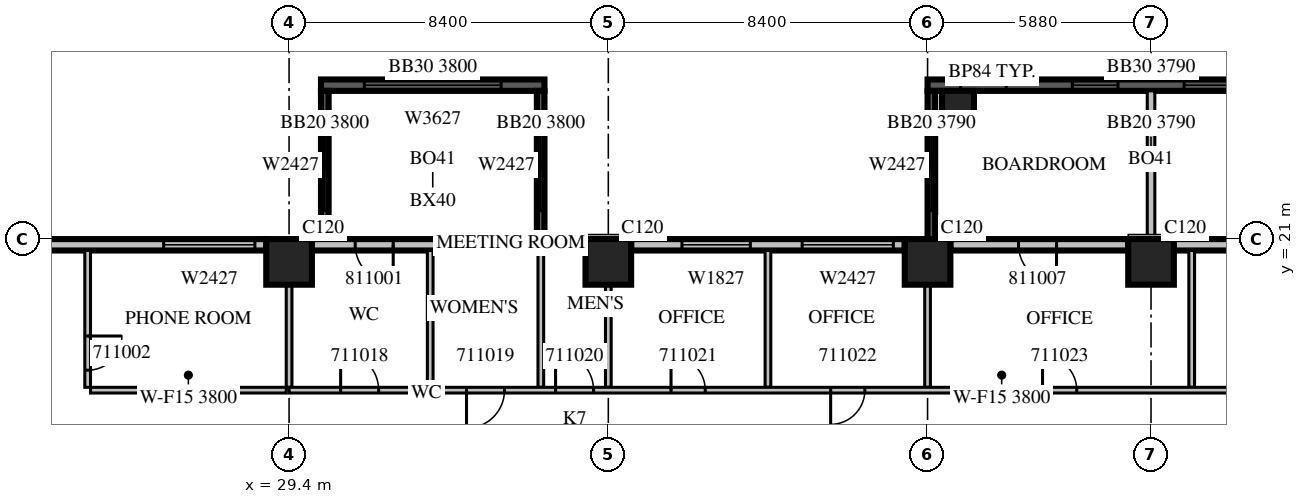
"""IFC4 building model, lengths in metres.
Left out: names, types, materials, properties, quantities, classifications, styles, units other than length and angle.
Written with IfcOpenShell. Run it as: python <this file> out.ifc"""

import sys

from ifc_helpers import new_model, si_unit, direction, frame, frame_2d, origin, origin_2d, place, context, subcontext, project, spatial, rectangle, extrude, source, transform, mapped, element, fill, save


model = new_model("IFC4")
c1 = context("Model", 3, precision=1e-05, world=origin(), true_north=direction((0.0, 1.0)))
c2 = subcontext(c1, "Body", "Model", "MODEL_VIEW")
j1 = project(units=[si_unit("LENGTHUNIT", "METRE"), si_unit("PLANEANGLEUNIT", "RADIAN")], contexts=[c1])
p1 = place(None, origin())
s1 = spatial("IfcSite", under=j1, at=p1, CompositionType="ELEMENT")
p2 = place(p1, origin())
s2 = spatial("IfcBuilding", under=s1, at=p2, CompositionType="ELEMENT")
p3 = place(p2, frame((0.0, 0.0, 57.3)))
s3 = spatial("IfcBuildingStorey", under=s2, at=p3, CompositionType="ELEMENT", Elevation=57.3)
m1 = source(origin(), c2, "Body", "SweptSolid", [
    extrude(rectangle(XDim=1.2, YDim=1.2, at=origin_2d()), origin(), (0.0, 0.0, 1.0), 4.2),
])
for number, where, z_axis, x_axis in (
    (1, (29.4, 20.4, 0.0), (0.0, 0.0, 1.0), (1.0, 0.0, 0.0)),
    (2, (37.8, 20.4, 0.0), (0.0, 0.0, 1.0), (1.0, 0.0, 0.0)),
    (3, (46.2, 20.4, 0.0), (0.0, 0.0, 1.0), (1.0, 0.0, 0.0)),
    (4, (52.08, 20.4, 0.0), (0.0, 0.0, 1.0), (1.0, 0.0, 0.0)),
):
    element("IfcColumn", number, at=place(p3, frame(where, z_axis=z_axis, x_axis=x_axis)), inside=s3, PredefinedType="COLUMN", context=c2, shape_type="MappedRepresentation", body=[
        mapped(m1, transform((0.0, 0.0, 0.0), scale=1.0)),
    ])
m2 = source(origin(), c2, "Body", "SweptSolid", [
    extrude(rectangle(XDim=0.84, YDim=0.84, at=origin_2d()), origin(), (0.0, 0.0, 1.0), 4.2),
])
p4 = place(p3, frame((47.0, 24.48, 0.0), z_axis=(0.0, 0.0, 1.0), x_axis=(1.0, 0.0, 0.0)))
e5 = element("IfcColumn", 5, at=p4, inside=s3, PredefinedType="COLUMN", context=c2, shape_type="MappedRepresentation", body=[
    mapped(m2, transform((0.0, 0.0, 0.0), scale=1.0)),
])
m3 = source(origin(), c2, "Body", "SweptSolid", [
    extrude(rectangle(XDim=11.76, YDim=0.3, at=frame_2d((5.88, 0.0))), origin(), (0.0, 0.0, 1.0), 3.79),
])
p5 = place(p3, frame((57.96, 25.05, 0.0), z_axis=(0.0, 0.0, 1.0), x_axis=(-1.0, 0.0, 0.0)))
e6 = element("IfcWall", 6, at=p5, inside=s3, PredefinedType="SOLIDWALL", context=c2, shape_type="MappedRepresentation", body=[
    mapped(m3, transform((0.0, 0.0, 0.0), scale=1.0)),
])
m4 = source(origin(), c2, "Body", "SweptSolid", [
    extrude(rectangle(XDim=1.2, YDim=2.7, at=frame_2d((0.6, 1.35))), frame((0.0, 0.16, 0.0), z_axis=(0.0, -1.0, 0.0), x_axis=(1.0, 0.0, 0.0)), (0.0, 0.0, 1.0), 0.32),
])
p6 = place(p5, frame((0.87, 0.0, 0.6)))
e7 = element("IfcOpeningElement", 7, at=p6, cuts=e6, PredefinedType="OPENING", context=c2, shape_type="MappedRepresentation", body=[
    mapped(m4, transform((0.0, 0.0, 0.0), scale=1.0)),
])
p7 = place(p5, frame((3.81, 0.0, 0.6)))
e8 = element("IfcOpeningElement", 8, at=p7, cuts=e6, PredefinedType="OPENING", context=c2, shape_type="MappedRepresentation", body=[
    mapped(m4, transform((0.0, 0.0, 0.0), scale=1.0)),
])
p8 = place(p5, frame((6.75, 0.0, 0.6)))
e9 = element("IfcOpeningElement", 9, at=p8, cuts=e6, PredefinedType="OPENING", context=c2, shape_type="MappedRepresentation", body=[
    mapped(m4, transform((0.0, 0.0, 0.0), scale=1.0)),
])
p9 = place(p5, frame((9.69, 0.0, 0.6)))
e10 = element("IfcOpeningElement", 10, at=p9, cuts=e6, PredefinedType="OPENING", context=c2, shape_type="MappedRepresentation", body=[
    mapped(m4, transform((0.0, 0.0, 0.0), scale=1.0)),
])
m5 = source(origin(), c2, "Body", "SweptSolid", [
    extrude(rectangle(XDim=3.9, YDim=0.2, at=frame_2d((1.95, 0.0))), origin(), (0.0, 0.0, 1.0), 3.79),
])
p10 = place(p3, frame((52.08, 21.0, 0.0), z_axis=(0.0, 0.0, 1.0), x_axis=(0.0, 1.0, 0.0)))
e11 = element("IfcWall", 11, at=p10, inside=s3, PredefinedType="SOLIDWALL", context=c2, shape_type="MappedRepresentation", body=[
    mapped(m5, transform((0.0, 0.0, 0.0), scale=1.0)),
])
m6 = source(origin(), c2, "Body", "SweptSolid", [
    extrude(rectangle(XDim=3.9, YDim=0.2, at=frame_2d((1.95, 0.0))), origin(), (0.0, 0.0, 1.0), 3.79),
])
p11 = place(p3, frame((46.3, 21.0, 0.0), z_axis=(0.0, 0.0, 1.0), x_axis=(0.0, 1.0, 0.0)))
e12 = element("IfcWall", 12, at=p11, inside=s3, PredefinedType="SOLIDWALL", context=c2, shape_type="MappedRepresentation", body=[
    mapped(m6, transform((0.0, 0.0, 0.0), scale=1.0)),
])
m7 = source(origin(), c2, "Body", "SweptSolid", [
    extrude(rectangle(XDim=2.4, YDim=2.7, at=frame_2d((1.2, 1.35))), frame((0.0, 0.11, 0.0), z_axis=(0.0, -1.0, 0.0), x_axis=(1.0, 0.0, 0.0)), (0.0, 0.0, 1.0), 0.22),
])
p12 = place(p11, frame((0.75, 0.0, 0.6)))
e13 = element("IfcOpeningElement", 13, at=p12, cuts=e12, PredefinedType="OPENING", context=c2, shape_type="MappedRepresentation", body=[
    mapped(m7, transform((0.0, 0.0, 0.0), scale=1.0)),
])
m8 = source(origin(), c2, "Body", "SweptSolid", [
    extrude(rectangle(XDim=5.88, YDim=0.3, at=frame_2d((2.94, 0.0))), origin(), (0.0, 0.0, 1.0), 3.8),
])
p13 = place(p3, frame((36.12, 25.05, 0.0), z_axis=(0.0, 0.0, 1.0), x_axis=(-1.0, 0.0, 0.0)))
e14 = element("IfcWall", 14, at=p13, inside=s3, PredefinedType="SOLIDWALL", context=c2, shape_type="MappedRepresentation", body=[
    mapped(m8, transform((0.0, 0.0, 0.0), scale=1.0)),
])
m9 = source(origin(), c2, "Body", "SweptSolid", [
    extrude(rectangle(XDim=3.6, YDim=2.7, at=frame_2d((1.8, 1.35))), frame((0.0, 0.16, 0.0), z_axis=(0.0, -1.0, 0.0), x_axis=(1.0, 0.0, 0.0)), (0.0, 0.0, 1.0), 0.32),
])
p14 = place(p13, frame((1.14, 0.0, 0.6)))
e15 = element("IfcOpeningElement", 15, at=p14, cuts=e14, PredefinedType="OPENING", context=c2, shape_type="MappedRepresentation", body=[
    mapped(m9, transform((0.0, 0.0, 0.0), scale=1.0)),
])
m10 = source(origin(), c2, "Body", "SweptSolid", [
    extrude(rectangle(XDim=3.9, YDim=0.2, at=frame_2d((1.95, 0.0))), origin(), (0.0, 0.0, 1.0), 3.8),
])
p15 = place(p3, frame((36.02, 21.0, 0.0), z_axis=(0.0, 0.0, 1.0), x_axis=(0.0, 1.0, 0.0)))
e16 = element("IfcWall", 16, at=p15, inside=s3, PredefinedType="SOLIDWALL", context=c2, shape_type="MappedRepresentation", body=[
    mapped(m10, transform((0.0, 0.0, 0.0), scale=1.0)),
])
p16 = place(p15, frame((0.75, 0.0, 0.6)))
e17 = element("IfcOpeningElement", 17, at=p16, cuts=e16, PredefinedType="OPENING", context=c2, shape_type="MappedRepresentation", body=[
    mapped(m7, transform((0.0, 0.0, 0.0), scale=1.0)),
])
p17 = place(p3, frame((30.34, 21.0, 0.0), z_axis=(0.0, 0.0, 1.0), x_axis=(0.0, 1.0, 0.0)))
e18 = element("IfcWall", 18, at=p17, inside=s3, PredefinedType="SOLIDWALL", context=c2, shape_type="MappedRepresentation", body=[
    mapped(m10, transform((0.0, 0.0, 0.0), scale=1.0)),
])
p18 = place(p17, frame((0.75, 0.0, 0.6)))
e19 = element("IfcOpeningElement", 19, at=p18, cuts=e18, PredefinedType="OPENING", context=c2, shape_type="MappedRepresentation", body=[
    mapped(m7, transform((0.0, 0.0, 0.0), scale=1.0)),
])
m11 = source(origin(), c2, "Body", "SweptSolid", [
    extrude(rectangle(XDim=4.68, YDim=0.3, at=frame_2d((2.34, 0.0))), origin(), (0.0, 0.0, 1.0), 3.8),
])
p19 = place(p3, frame((57.36, 20.85, 0.0), z_axis=(0.0, 0.0, 1.0), x_axis=(-1.0, 0.0, 0.0)))
e20 = element("IfcWall", 20, at=p19, inside=s3, PredefinedType="STANDARD", context=c2, shape_type="MappedRepresentation", body=[
    mapped(m11, transform((0.0, 0.0, 0.0), scale=1.0)),
])
m12 = source(origin(), c2, "Body", "SweptSolid", [
    extrude(rectangle(XDim=1.0, YDim=2.1, at=frame_2d((0.5, 1.05))), frame((0.0, 0.16, 0.0), z_axis=(0.0, -1.0, 0.0), x_axis=(1.0, 0.0, 0.0)), (0.0, 0.0, 1.0), 0.32),
])
p20 = place(p19, frame((1.793, 0.0, 0.0)))
e21 = element("IfcOpeningElement", 21, at=p20, cuts=e20, PredefinedType="OPENING", context=c2, shape_type="MappedRepresentation", body=[
    mapped(m12, transform((0.0, 0.0, 0.0), scale=1.0)),
])
p21 = place(p3, frame((51.48, 20.85, 0.0), z_axis=(0.0, 0.0, 1.0), x_axis=(-1.0, 0.0, 0.0)))
e22 = element("IfcWall", 22, at=p21, inside=s3, PredefinedType="STANDARD", context=c2, shape_type="MappedRepresentation", body=[
    mapped(m11, transform((0.0, 0.0, 0.0), scale=1.0)),
])
p22 = place(p21, frame((1.887, 0.0, 0.0)))
e23 = element("IfcOpeningElement", 23, at=p22, cuts=e22, PredefinedType="OPENING", context=c2, shape_type="MappedRepresentation", body=[
    mapped(m12, transform((0.0, 0.0, 0.0), scale=1.0)),
])
m13 = source(origin(), c2, "Body", "SweptSolid", [
    extrude(rectangle(XDim=7.2, YDim=0.3, at=frame_2d((3.6, 0.0))), origin(), (0.0, 0.0, 1.0), 3.8),
])
p23 = place(p3, frame((45.6, 20.85, 0.0), z_axis=(0.0, 0.0, 1.0), x_axis=(-1.0, 0.0, 0.0)))
e24 = element("IfcWall", 24, at=p23, inside=s3, PredefinedType="STANDARD", context=c2, shape_type="MappedRepresentation", body=[
    mapped(m13, transform((0.0, 0.0, 0.0), scale=1.0)),
])
m14 = source(origin(), c2, "Body", "SweptSolid", [
    extrude(rectangle(XDim=2.4, YDim=2.7, at=frame_2d((1.2, 1.35))), frame((0.0, 0.16, 0.0), z_axis=(0.0, -1.0, 0.0), x_axis=(1.0, 0.0, 0.0)), (0.0, 0.0, 1.0), 0.32),
])
p24 = place(p23, frame((0.3, 0.0, 0.6)))
e25 = element("IfcOpeningElement", 25, at=p24, cuts=e24, PredefinedType="OPENING", context=c2, shape_type="MappedRepresentation", body=[
    mapped(m14, transform((0.0, 0.0, 0.0), scale=1.0)),
])
m15 = source(origin(), c2, "Body", "SweptSolid", [
    extrude(rectangle(XDim=1.8, YDim=2.7, at=frame_2d((0.9, 1.35))), frame((0.0, 0.16, 0.0), z_axis=(0.0, -1.0, 0.0), x_axis=(1.0, 0.0, 0.0)), (0.0, 0.0, 1.0), 0.32),
])
p25 = place(p23, frame((4.062, 0.0, 0.6)))
e26 = element("IfcOpeningElement", 26, at=p25, cuts=e24, PredefinedType="OPENING", context=c2, shape_type="MappedRepresentation", body=[
    mapped(m15, transform((0.0, 0.0, 0.0), scale=1.0)),
])
p26 = place(p3, frame((37.2, 20.85, 0.0), z_axis=(0.0, 0.0, 1.0), x_axis=(-1.0, 0.0, 0.0)))
e27 = element("IfcWall", 27, at=p26, inside=s3, PredefinedType="STANDARD", context=c2, shape_type="MappedRepresentation", body=[
    mapped(m13, transform((0.0, 0.0, 0.0), scale=1.0)),
])
p27 = place(p26, frame((5.06, 0.0, 0.0)))
e28 = element("IfcOpeningElement", 28, at=p27, cuts=e27, PredefinedType="OPENING", context=c2, shape_type="MappedRepresentation", body=[
    mapped(m12, transform((0.0, 0.0, 0.0), scale=1.0)),
])
m16 = source(origin(), c2, "Body", "SweptSolid", [
    extrude(rectangle(XDim=6.6, YDim=0.3, at=frame_2d((3.3, 0.0))), origin(), (0.0, 0.0, 1.0), 3.8),
])
p28 = place(p3, frame((28.8, 20.85, 0.0), z_axis=(0.0, 0.0, 1.0), x_axis=(-1.0, 0.0, 0.0)))
e29 = element("IfcWall", 29, at=p28, inside=s3, PredefinedType="STANDARD", context=c2, shape_type="MappedRepresentation", body=[
    mapped(m16, transform((0.0, 0.0, 0.0), scale=1.0)),
])
p29 = place(p28, frame((0.3, 0.0, 0.6)))
e30 = element("IfcOpeningElement", 30, at=p29, cuts=e29, PredefinedType="OPENING", context=c2, shape_type="MappedRepresentation", body=[
    mapped(m14, transform((0.0, 0.0, 0.0), scale=1.0)),
])
m17 = source(origin(), c2, "Body", "SweptSolid", [
    extrude(rectangle(XDim=3.6, YDim=0.15, at=frame_2d((1.8, 0.0))), origin(), (0.0, 0.0, 1.0), 3.8),
])
p30 = place(p3, frame((24.1, 20.7, 0.0), z_axis=(0.0, 0.0, 1.0), x_axis=(0.0, -1.0, 0.0)))
e31 = element("IfcWall", 31, at=p30, inside=s3, PredefinedType="PARTITIONING", context=c2, shape_type="MappedRepresentation", body=[
    mapped(m17, transform((0.0, 0.0, 0.0), scale=1.0)),
])
m18 = source(origin(), c2, "Body", "SweptSolid", [
    extrude(rectangle(XDim=0.9, YDim=2.1, at=frame_2d((0.45, 1.05))), frame((0.0, 0.085, 0.0), z_axis=(0.0, -1.0, 0.0), x_axis=(1.0, 0.0, 0.0)), (0.0, 0.0, 1.0), 0.17),
])
p31 = place(p30, frame((2.25, 0.0, 0.0)))
e32 = element("IfcOpeningElement", 32, at=p31, cuts=e31, PredefinedType="OPENING", context=c2, shape_type="MappedRepresentation", body=[
    mapped(m18, transform((0.0, 0.0, 0.0), scale=1.0)),
])
m19 = source(origin(), c2, "Body", "SweptSolid", [
    extrude(rectangle(XDim=5.15, YDim=0.15, at=frame_2d((2.575, 0.0))), origin(), (0.0, 0.0, 1.0), 3.8),
])
p32 = place(p3, frame((24.175, 17.025, 0.0), z_axis=(0.0, 0.0, 1.0), x_axis=(1.0, 0.0, 0.0)))
e33 = element("IfcWall", 33, at=p32, inside=s3, PredefinedType="PARTITIONING", context=c2, shape_type="MappedRepresentation", body=[
    mapped(m19, transform((0.0, 0.0, 0.0), scale=1.0)),
])
m20 = source(origin(), c2, "Body", "SweptSolid", [
    extrude(rectangle(XDim=2.701, YDim=0.15, at=frame_2d((1.351, 0.0))), origin(), (0.0, 0.0, 1.0), 3.8),
])
p33 = place(p3, frame((29.4, 17.1, 0.0), z_axis=(0.0, 0.0, 1.0), x_axis=(0.0, 1.0, 0.0)))
e34 = element("IfcWall", 34, at=p33, inside=s3, PredefinedType="PARTITIONING", context=c2, shape_type="MappedRepresentation", body=[
    mapped(m20, transform((0.0, 0.0, 0.0), scale=1.0)),
])
for number, where, z_axis, x_axis in (
    (35, (33.113, 20.7, 0.0), (0.0, 0.0, 1.0), (0.0, -1.0, 0.0)),
    (36, (36.024, 20.7, 0.0), (0.0, 0.0, 1.0), (0.0, -1.0, 0.0)),
    (37, (42.0, 20.7, 0.0), (0.0, 0.0, 1.0), (0.0, -1.0, 0.0)),
    (38, (53.15, 20.7, 0.0), (0.0, 0.0, 1.0), (0.0, -1.0, 0.0)),
):
    element("IfcWall", number, at=place(p3, frame(where, z_axis=z_axis, x_axis=x_axis)), inside=s3, PredefinedType="PARTITIONING", context=c2, shape_type="MappedRepresentation", body=[
        mapped(m17, transform((0.0, 0.0, 0.0), scale=1.0)),
    ])
for number, where, z_axis, x_axis in (
    (39, (37.8, 17.1, 0.0), (0.0, 0.0, 1.0), (0.0, 1.0, 0.0)),
    (40, (46.2, 17.1, 0.0), (0.0, 0.0, 1.0), (0.0, 1.0, 0.0)),
):
    element("IfcWall", number, at=place(p3, frame(where, z_axis=z_axis, x_axis=x_axis)), inside=s3, PredefinedType="PARTITIONING", context=c2, shape_type="MappedRepresentation", body=[
        mapped(m20, transform((0.0, 0.0, 0.0), scale=1.0)),
    ])
m21 = source(origin(), c2, "Body", "SweptSolid", [
    extrude(rectangle(XDim=37.5, YDim=0.15, at=frame_2d((18.75, 0.0))), origin(), (0.0, 0.0, 1.0), 3.8),
])
p34 = place(p3, frame((29.4, 17.025, 0.0), z_axis=(0.0, 0.0, 1.0), x_axis=(1.0, 0.0, 0.0)))
e41 = element("IfcWall", 41, at=p34, inside=s3, PredefinedType="PARTITIONING", context=c2, shape_type="MappedRepresentation", body=[
    mapped(m21, transform((0.0, 0.0, 0.0), scale=1.0)),
])
m22 = source(origin(), c2, "Body", "SweptSolid", [
    extrude(rectangle(XDim=1.0, YDim=2.1, at=frame_2d((0.5, 1.05))), frame((0.0, 0.085, 0.0), z_axis=(0.0, -1.0, 0.0), x_axis=(1.0, 0.0, 0.0)), (0.0, 0.0, 1.0), 0.17),
])
p35 = place(p34, frame((1.357, 0.0, 0.0)))
e42 = element("IfcOpeningElement", 42, at=p35, cuts=e41, PredefinedType="OPENING", context=c2, shape_type="MappedRepresentation", body=[
    mapped(m22, transform((0.0, 0.0, 0.0), scale=1.0)),
])
p36 = place(p34, frame((4.669, 0.0, 0.0)))
e43 = element("IfcOpeningElement", 43, at=p36, cuts=e41, PredefinedType="OPENING", context=c2, shape_type="MappedRepresentation", body=[
    mapped(m22, transform((0.0, 0.0, 0.0), scale=1.0)),
])
p37 = place(p34, frame((7.012, 0.0, 0.0)))
e44 = element("IfcOpeningElement", 44, at=p37, cuts=e41, PredefinedType="OPENING", context=c2, shape_type="MappedRepresentation", body=[
    mapped(m22, transform((0.0, 0.0, 0.0), scale=1.0)),
])
p38 = place(p34, frame((10.05, 0.0, 0.0)))
e45 = element("IfcOpeningElement", 45, at=p38, cuts=e41, PredefinedType="OPENING", context=c2, shape_type="MappedRepresentation", body=[
    mapped(m18, transform((0.0, 0.0, 0.0), scale=1.0)),
])
p39 = place(p34, frame((14.25, 0.0, 0.0)))
e46 = element("IfcOpeningElement", 46, at=p39, cuts=e41, PredefinedType="OPENING", context=c2, shape_type="MappedRepresentation", body=[
    mapped(m18, transform((0.0, 0.0, 0.0), scale=1.0)),
])
p40 = place(p34, frame((19.825, 0.0, 0.0)))
e47 = element("IfcOpeningElement", 47, at=p40, cuts=e41, PredefinedType="OPENING", context=c2, shape_type="MappedRepresentation", body=[
    mapped(m18, transform((0.0, 0.0, 0.0), scale=1.0)),
])
p41 = place(p34, frame((26.738, 0.0, 0.0)))
e48 = element("IfcOpeningElement", 48, at=p41, cuts=e41, PredefinedType="OPENING", context=c2, shape_type="MappedRepresentation", body=[
    mapped(m18, transform((0.0, 0.0, 0.0), scale=1.0)),
])
p42 = place(p34, frame((33.65, 0.0, 0.0)))
e49 = element("IfcOpeningElement", 49, at=p42, cuts=e41, PredefinedType="OPENING", context=c2, shape_type="MappedRepresentation", body=[
    mapped(m18, transform((0.0, 0.0, 0.0), scale=1.0)),
])
m23 = source(origin(), c2, "Body", "SweptSolid", [
    extrude(rectangle(XDim=1.2, YDim=2.7, at=frame_2d((0.6, 1.35))), frame((0.0, 0.03, 0.0), z_axis=(0.0, -1.0, 0.0), x_axis=(1.0, 0.0, 0.0)), (0.0, 0.0, 1.0), 0.06),
])
p43 = place(p7, origin())
e50 = element("IfcWindow", 50, at=p43, inside=s3, PartitioningType="SINGLE_PANEL", PredefinedType="WINDOW", context=c2, shape_type="MappedRepresentation", body=[
    mapped(m23, transform((0.0, 0.0, 0.0), scale=1.0)),
])
fill(e8, e50)
p44 = place(p8, origin())
e51 = element("IfcWindow", 51, at=p44, inside=s3, PartitioningType="SINGLE_PANEL", PredefinedType="WINDOW", context=c2, shape_type="MappedRepresentation", body=[
    mapped(m23, transform((0.0, 0.0, 0.0), scale=1.0)),
])
fill(e9, e51)
p45 = place(p9, origin())
e52 = element("IfcWindow", 52, at=p45, inside=s3, PartitioningType="SINGLE_PANEL", PredefinedType="WINDOW", context=c2, shape_type="MappedRepresentation", body=[
    mapped(m23, transform((0.0, 0.0, 0.0), scale=1.0)),
])
fill(e10, e52)
m24 = source(origin(), c2, "Body", "SweptSolid", [
    extrude(rectangle(XDim=2.4, YDim=2.7, at=frame_2d((1.2, 1.35))), frame((0.0, 0.03, 0.0), z_axis=(0.0, -1.0, 0.0), x_axis=(1.0, 0.0, 0.0)), (0.0, 0.0, 1.0), 0.06),
])
p46 = place(p12, origin())
e53 = element("IfcWindow", 53, at=p46, inside=s3, PartitioningType="SINGLE_PANEL", PredefinedType="WINDOW", context=c2, shape_type="MappedRepresentation", body=[
    mapped(m24, transform((0.0, 0.0, 0.0), scale=1.0)),
])
fill(e13, e53)
m25 = source(origin(), c2, "Body", "SweptSolid", [
    extrude(rectangle(XDim=3.6, YDim=2.7, at=frame_2d((1.8, 1.35))), frame((0.0, 0.03, 0.0), z_axis=(0.0, -1.0, 0.0), x_axis=(1.0, 0.0, 0.0)), (0.0, 0.0, 1.0), 0.06),
])
p47 = place(p14, origin())
e54 = element("IfcWindow", 54, at=p47, inside=s3, PartitioningType="SINGLE_PANEL", PredefinedType="WINDOW", context=c2, shape_type="MappedRepresentation", body=[
    mapped(m25, transform((0.0, 0.0, 0.0), scale=1.0)),
])
fill(e15, e54)
p48 = place(p16, origin())
e55 = element("IfcWindow", 55, at=p48, inside=s3, PartitioningType="SINGLE_PANEL", PredefinedType="WINDOW", context=c2, shape_type="MappedRepresentation", body=[
    mapped(m24, transform((0.0, 0.0, 0.0), scale=1.0)),
])
fill(e17, e55)
p49 = place(p18, origin())
e56 = element("IfcWindow", 56, at=p49, inside=s3, PartitioningType="SINGLE_PANEL", PredefinedType="WINDOW", context=c2, shape_type="MappedRepresentation", body=[
    mapped(m24, transform((0.0, 0.0, 0.0), scale=1.0)),
])
fill(e19, e56)
p50 = place(p24, origin())
e57 = element("IfcWindow", 57, at=p50, inside=s3, PartitioningType="SINGLE_PANEL", PredefinedType="WINDOW", context=c2, shape_type="MappedRepresentation", body=[
    mapped(m24, transform((0.0, 0.0, 0.0), scale=1.0)),
])
fill(e25, e57)
p51 = place(p29, origin())
e58 = element("IfcWindow", 58, at=p51, inside=s3, PartitioningType="SINGLE_PANEL", PredefinedType="WINDOW", context=c2, shape_type="MappedRepresentation", body=[
    mapped(m24, transform((0.0, 0.0, 0.0), scale=1.0)),
])
fill(e30, e58)
m26 = source(origin(), c2, "Body", "SweptSolid", [
    extrude(rectangle(XDim=1.8, YDim=2.7, at=frame_2d((0.9, 1.35))), frame((0.0, 0.03, 0.0), z_axis=(0.0, -1.0, 0.0), x_axis=(1.0, 0.0, 0.0)), (0.0, 0.0, 1.0), 0.06),
])
p52 = place(p25, origin())
e59 = element("IfcWindow", 59, at=p52, inside=s3, PartitioningType="SINGLE_PANEL", PredefinedType="WINDOW", context=c2, shape_type="MappedRepresentation", body=[
    mapped(m26, transform((0.0, 0.0, 0.0), scale=1.0)),
])
fill(e26, e59)
m27 = source(origin(), c2, "Body", "SweptSolid", [
    extrude(rectangle(XDim=0.9, YDim=2.1, at=frame_2d((0.45, 1.05))), frame((0.0, 0.025, 0.0), z_axis=(0.0, -1.0, 0.0), x_axis=(1.0, 0.0, 0.0)), (0.0, 0.0, 1.0), 0.05),
])
p53 = place(p31, origin())
e60 = element("IfcDoor", 60, at=p53, inside=s3, OperationType="SINGLE_SWING_LEFT", PredefinedType="DOOR", context=c2, shape_type="MappedRepresentation", body=[
    mapped(m27, transform((0.0, 0.0, 0.0), scale=1.0)),
])
fill(e32, e60)
m28 = source(origin(), c2, "Body", "SweptSolid", [
    extrude(rectangle(XDim=1.0, YDim=2.1, at=frame_2d((0.5, 1.05))), frame((0.0, 0.025, 0.0), z_axis=(0.0, -1.0, 0.0), x_axis=(1.0, 0.0, 0.0)), (0.0, 0.0, 1.0), 0.05),
])
p54 = place(p35, origin())
e61 = element("IfcDoor", 61, at=p54, inside=s3, OperationType="SINGLE_SWING_LEFT", PredefinedType="DOOR", context=c2, shape_type="MappedRepresentation", body=[
    mapped(m28, transform((0.0, 0.0, 0.0), scale=1.0)),
])
fill(e42, e61)
p55 = place(p36, origin())
e62 = element("IfcDoor", 62, at=p55, inside=s3, OperationType="SINGLE_SWING_RIGHT", PredefinedType="DOOR", context=c2, shape_type="MappedRepresentation", body=[
    mapped(m28, transform((0.0, 0.0, 0.0), scale=1.0)),
])
fill(e43, e62)
p56 = place(p37, origin())
e63 = element("IfcDoor", 63, at=p56, inside=s3, OperationType="SINGLE_SWING_LEFT", PredefinedType="DOOR", context=c2, shape_type="MappedRepresentation", body=[
    mapped(m28, transform((0.0, 0.0, 0.0), scale=1.0)),
])
fill(e44, e63)
p57 = place(p38, origin())
e64 = element("IfcDoor", 64, at=p57, inside=s3, OperationType="SINGLE_SWING_LEFT", PredefinedType="DOOR", context=c2, shape_type="MappedRepresentation", body=[
    mapped(m27, transform((0.0, 0.0, 0.0), scale=1.0)),
])
fill(e45, e64)
p58 = place(p39, origin())
e65 = element("IfcDoor", 65, at=p58, inside=s3, OperationType="SINGLE_SWING_RIGHT", PredefinedType="DOOR", context=c2, shape_type="MappedRepresentation", body=[
    mapped(m27, transform((0.0, 0.0, 0.0), scale=1.0)),
])
fill(e46, e65)
p59 = place(p40, origin())
e66 = element("IfcDoor", 66, at=p59, inside=s3, OperationType="SINGLE_SWING_LEFT", PredefinedType="DOOR", context=c2, shape_type="MappedRepresentation", body=[
    mapped(m27, transform((0.0, 0.0, 0.0), scale=1.0)),
])
fill(e47, e66)
p60 = place(p27, origin())
e67 = element("IfcDoor", 67, at=p60, inside=s3, OperationType="SINGLE_SWING_LEFT", PredefinedType="DOOR", context=c2, shape_type="MappedRepresentation", body=[
    mapped(m28, transform((0.0, 0.0, 0.0), scale=1.0)),
])
fill(e28, e67)
p61 = place(p22, origin())
e68 = element("IfcDoor", 68, at=p61, inside=s3, OperationType="SINGLE_SWING_LEFT", PredefinedType="DOOR", context=c2, shape_type="MappedRepresentation", body=[
    mapped(m28, transform((0.0, 0.0, 0.0), scale=1.0)),
])
fill(e23, e68)
save(model, sys.argv[1])
